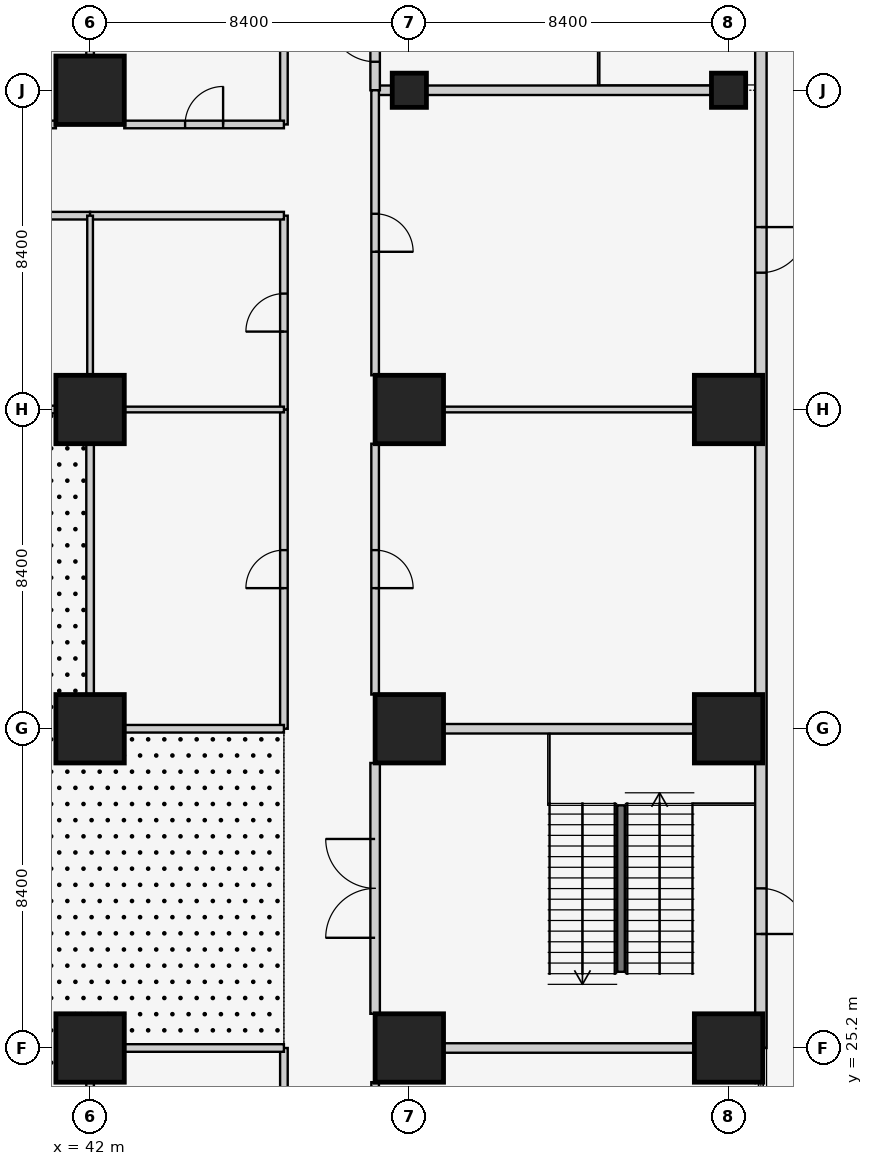
"""IFC4 building model, lengths in metres.
Left out: names, types, materials, properties, quantities, classifications, styles, units other than length and angle.
Written with IfcOpenShell. Run it as: python <this file> out.ifc"""

import sys

from ifc_helpers import new_model, si_unit, direction, frame, frame_2d, origin, origin_2d, place, context, subcontext, project, spatial, rectangle, extrude, element, fill, save


model = new_model("IFC4")
c1 = context("Model", 3, precision=1e-05, world=origin(), true_north=direction((0.0, 1.0)))
c2 = subcontext(c1, "Body", "Model", "MODEL_VIEW")
j1 = project(units=[si_unit("LENGTHUNIT", "METRE"), si_unit("PLANEANGLEUNIT", "RADIAN")], contexts=[c1])
p1 = place(None, origin())
s1 = spatial("IfcSite", under=j1, at=p1, CompositionType="ELEMENT")
p2 = place(p1, origin())
s2 = spatial("IfcBuilding", under=s1, at=p2, CompositionType="ELEMENT")
p3 = place(p2, origin())
s3 = spatial("IfcBuildingStorey", under=s2, at=p3, CompositionType="ELEMENT", Elevation=0.0)
for number, where, z_axis, x_axis in (
    (1, (42.0, 25.2, 0.0), (0.0, 0.0, 1.0), (1.0, 0.0, 0.0)),
    (2, (42.0, 33.6, 0.0), (0.0, 0.0, 1.0), (1.0, 0.0, 0.0)),
    (3, (42.0, 42.0, 0.0), (0.0, 0.0, 1.0), (1.0, 0.0, 0.0)),
    (4, (42.0, 50.4, 0.0), (0.0, 0.0, 1.0), (1.0, 0.0, 0.0)),
    (5, (50.4, 25.2, 0.0), (0.0, 0.0, 1.0), (1.0, 0.0, 0.0)),
    (6, (50.4, 33.6, 0.0), (0.0, 0.0, 1.0), (1.0, 0.0, 0.0)),
    (7, (50.4, 42.0, 0.0), (0.0, 0.0, 1.0), (1.0, 0.0, 0.0)),
):
    element("IfcColumn", number, at=place(p3, frame(where, z_axis=z_axis, x_axis=x_axis)), inside=s3, PredefinedType="COLUMN", context=c2, shape_type="SweptSolid", body=[
        extrude(rectangle(XDim=1.8, YDim=1.8, at=origin_2d()), origin(), (0.0, 0.0, 1.0), 6.0),
    ])
p4 = place(p3, frame((50.4, 50.4, 0.0), z_axis=(0.0, 0.0, 1.0), x_axis=(1.0, 0.0, 0.0)))
e8 = element("IfcColumn", 8, at=p4, inside=s3, PredefinedType="COLUMN", context=c2, shape_type="SweptSolid", body=[
    extrude(rectangle(XDim=0.9, YDim=0.9, at=origin_2d()), origin(), (0.0, 0.0, 1.0), 6.0),
])
for number, where, z_axis, x_axis in (
    (9, (58.8, 25.2, 0.0), (0.0, 0.0, 1.0), (1.0, 0.0, 0.0)),
    (10, (58.8, 33.6, 0.0), (0.0, 0.0, 1.0), (1.0, 0.0, 0.0)),
    (11, (58.8, 42.0, 0.0), (0.0, 0.0, 1.0), (1.0, 0.0, 0.0)),
):
    element("IfcColumn", number, at=place(p3, frame(where, z_axis=z_axis, x_axis=x_axis)), inside=s3, PredefinedType="COLUMN", context=c2, shape_type="SweptSolid", body=[
        extrude(rectangle(XDim=1.8, YDim=1.8, at=origin_2d()), origin(), (0.0, 0.0, 1.0), 6.0),
    ])
p5 = place(p3, frame((58.8, 50.4, 0.0), z_axis=(0.0, 0.0, 1.0), x_axis=(1.0, 0.0, 0.0)))
e12 = element("IfcColumn", 12, at=p5, inside=s3, PredefinedType="COLUMN", context=c2, shape_type="SweptSolid", body=[
    extrude(rectangle(XDim=0.9, YDim=0.9, at=origin_2d()), origin(), (0.0, 0.0, 1.0), 6.0),
])
p6 = place(p3, frame((59.65, 25.2, 0.0), z_axis=(0.0, 0.0, 1.0), x_axis=(0.0, 1.0, 0.0)))
e13 = element("IfcWall", 13, at=p6, inside=s3, PredefinedType="SOLIDWALL", context=c2, shape_type="SweptSolid", body=[
    extrude(rectangle(XDim=33.2, YDim=0.3, at=frame_2d((16.6, 0.0))), origin(), (0.0, 0.0, 1.0), 5.8),
])
p7 = place(p6, frame((3.0, 0.0, 0.0)))
e14 = element("IfcOpeningElement", 14, at=p7, cuts=e13, PredefinedType="OPENING", context=c2, shape_type="SweptSolid", body=[
    extrude(rectangle(XDim=1.2, YDim=2.4, at=frame_2d((0.6, 1.2))), frame((0.0, 0.16, 0.0), z_axis=(0.0, -1.0, 0.0), x_axis=(1.0, 0.0, 0.0)), (0.0, 0.0, 1.0), 0.32),
])
p8 = place(p6, frame((20.4, 0.0, 0.0)))
e15 = element("IfcOpeningElement", 15, at=p8, cuts=e13, PredefinedType="OPENING", context=c2, shape_type="SweptSolid", body=[
    extrude(rectangle(XDim=1.2, YDim=2.4, at=frame_2d((0.6, 1.2))), frame((0.0, 0.16, 0.0), z_axis=(0.0, -1.0, 0.0), x_axis=(1.0, 0.0, 0.0)), (0.0, 0.0, 1.0), 0.32),
])
p9 = place(p6, frame((30.2, 0.0, 0.0)))
e16 = element("IfcOpeningElement", 16, at=p9, cuts=e13, PredefinedType="OPENING", context=c2, shape_type="SweptSolid", body=[
    extrude(rectangle(XDim=1.8, YDim=2.4, at=frame_2d((0.9, 1.2))), frame((0.0, 0.16, 0.0), z_axis=(0.0, -1.0, 0.0), x_axis=(1.0, 0.0, 0.0)), (0.0, 0.0, 1.0), 0.32),
])
for number, where, z_axis, x_axis in (
    (17, (57.9, 25.2, 0.0), (0.0, 0.0, 1.0), (-1.0, 0.0, 0.0)),
    (18, (51.3, 33.6, 0.0), (0.0, 0.0, 1.0), (1.0, 0.0, 0.0)),
):
    element("IfcWall", number, at=place(p3, frame(where, z_axis=z_axis, x_axis=x_axis)), inside=s3, PredefinedType="SOLIDWALL", context=c2, shape_type="SweptSolid", body=[
        extrude(rectangle(XDim=6.6, YDim=0.25, at=frame_2d((3.3, 0.0))), origin(), (0.0, 0.0, 1.0), 5.043),
    ])
p10 = place(p3, frame((49.5, 26.1, 0.0), z_axis=(0.0, 0.0, 1.0), x_axis=(0.0, 1.0, 0.0)))
e19 = element("IfcWall", 19, at=p10, inside=s3, PredefinedType="SOLIDWALL", context=c2, shape_type="SweptSolid", body=[
    extrude(rectangle(XDim=6.6, YDim=0.25, at=frame_2d((3.3, 0.0))), origin(), (0.0, 0.0, 1.0), 5.8),
])
p11 = place(p10, frame((2.0, 0.0, 0.0)))
e20 = element("IfcOpeningElement", 20, at=p11, cuts=e19, PredefinedType="OPENING", context=c2, shape_type="SweptSolid", body=[
    extrude(rectangle(XDim=2.6, YDim=2.4, at=frame_2d((1.3, 1.2))), frame((0.0, 0.135, 0.0), z_axis=(0.0, -1.0, 0.0), x_axis=(1.0, 0.0, 0.0)), (0.0, 0.0, 1.0), 0.27),
])
p12 = place(p3, frame((49.95, 50.4, 0.0), z_axis=(0.0, 0.0, 1.0), x_axis=(-1.0, 0.0, 0.0)))
e21 = element("IfcWall", 21, at=p12, inside=s3, PredefinedType="SOLIDWALL", context=c2, shape_type="SweptSolid", body=[
    extrude(rectangle(XDim=0.45, YDim=0.25, at=frame_2d((0.225, 0.0))), origin(), (0.0, 0.0, 1.0), 5.043),
])
p13 = place(p3, frame((58.35, 50.4, 0.0), z_axis=(0.0, 0.0, 1.0), x_axis=(-1.0, 0.0, 0.0)))
e22 = element("IfcWall", 22, at=p13, inside=s3, PredefinedType="SOLIDWALL", context=c2, shape_type="SweptSolid", body=[
    extrude(rectangle(XDim=7.5, YDim=0.25, at=frame_2d((3.75, 0.0))), origin(), (0.0, 0.0, 1.0), 5.043),
])
p14 = place(p3, frame((49.5, 50.4, 0.0), z_axis=(0.0, 0.0, 1.0), x_axis=(0.0, 1.0, 0.0)))
e23 = element("IfcWall", 23, at=p14, inside=s3, PredefinedType="SOLIDWALL", context=c2, shape_type="SweptSolid", body=[
    extrude(rectangle(XDim=2.7, YDim=0.25, at=frame_2d((1.35, 0.0))), origin(), (0.0, 0.0, 1.0), 5.8),
])
p15 = place(p14, frame((0.75, 0.0, 0.0)))
e24 = element("IfcOpeningElement", 24, at=p15, cuts=e23, PredefinedType="OPENING", context=c2, shape_type="SweptSolid", body=[
    extrude(rectangle(XDim=1.2, YDim=2.1, at=frame_2d((0.6, 1.05))), frame((0.0, 0.135, 0.0), z_axis=(0.0, -1.0, 0.0), x_axis=(1.0, 0.0, 0.0)), (0.0, 0.0, 1.0), 0.27),
])
p16 = place(p3, frame((49.5, 17.7, 0.0), z_axis=(0.0, 0.0, 1.0), x_axis=(0.0, 1.0, 0.0)))
e25 = element("IfcWall", 25, at=p16, inside=s3, PredefinedType="PARTITIONING", context=c2, shape_type="SweptSolid", body=[
    extrude(rectangle(XDim=6.6, YDim=0.2, at=frame_2d((3.3, 0.0))), origin(), (0.0, 0.0, 1.0), 5.8),
])
p17 = place(p16, frame((2.8, 0.0, 0.0)))
e26 = element("IfcOpeningElement", 26, at=p17, cuts=e25, PredefinedType="OPENING", context=c2, shape_type="SweptSolid", body=[
    extrude(rectangle(XDim=1.0, YDim=2.1, at=frame_2d((0.5, 1.05))), frame((0.0, 0.11, 0.0), z_axis=(0.0, -1.0, 0.0), x_axis=(1.0, 0.0, 0.0)), (0.0, 0.0, 1.0), 0.22),
])
p18 = place(p3, frame((51.3, 42.0, 0.0), z_axis=(0.0, 0.0, 1.0), x_axis=(1.0, 0.0, 0.0)))
e27 = element("IfcWall", 27, at=p18, inside=s3, PredefinedType="PARTITIONING", context=c2, shape_type="SweptSolid", body=[
    extrude(rectangle(XDim=6.6, YDim=0.15, at=frame_2d((3.3, 0.0))), origin(), (0.0, 0.0, 1.0), 5.043),
])
p19 = place(p3, frame((49.5, 34.5, 0.0), z_axis=(0.0, 0.0, 1.0), x_axis=(0.0, 1.0, 0.0)))
e28 = element("IfcWall", 28, at=p19, inside=s3, PredefinedType="PARTITIONING", context=c2, shape_type="SweptSolid", body=[
    extrude(rectangle(XDim=6.6, YDim=0.2, at=frame_2d((3.3, 0.0))), origin(), (0.0, 0.0, 1.0), 5.8),
])
p20 = place(p19, frame((2.8, 0.0, 0.0)))
e29 = element("IfcOpeningElement", 29, at=p20, cuts=e28, PredefinedType="OPENING", context=c2, shape_type="SweptSolid", body=[
    extrude(rectangle(XDim=1.0, YDim=2.1, at=frame_2d((0.5, 1.05))), frame((0.0, 0.11, 0.0), z_axis=(0.0, -1.0, 0.0), x_axis=(1.0, 0.0, 0.0)), (0.0, 0.0, 1.0), 0.22),
])
p21 = place(p3, frame((49.5, 42.9, 0.0), z_axis=(0.0, 0.0, 1.0), x_axis=(0.0, 1.0, 0.0)))
e30 = element("IfcWall", 30, at=p21, inside=s3, PredefinedType="PARTITIONING", context=c2, shape_type="SweptSolid", body=[
    extrude(rectangle(XDim=7.5, YDim=0.2, at=frame_2d((3.75, 0.0))), origin(), (0.0, 0.0, 1.0), 5.8),
])
p22 = place(p21, frame((3.25, 0.0, 0.0)))
e31 = element("IfcOpeningElement", 31, at=p22, cuts=e30, PredefinedType="OPENING", context=c2, shape_type="SweptSolid", body=[
    extrude(rectangle(XDim=1.0, YDim=2.1, at=frame_2d((0.5, 1.05))), frame((0.0, 0.11, 0.0), z_axis=(0.0, -1.0, 0.0), x_axis=(1.0, 0.0, 0.0)), (0.0, 0.0, 1.0), 0.22),
])
p23 = place(p3, frame((42.0, 57.9, 0.0), z_axis=(0.0, 0.0, 1.0), x_axis=(0.0, -1.0, 0.0)))
e32 = element("IfcWall", 32, at=p23, inside=s3, PredefinedType="SOLIDWALL", context=c2, shape_type="SweptSolid", body=[
    extrude(rectangle(XDim=6.6, YDim=0.2, at=frame_2d((3.3, 0.0))), origin(), (0.0, 0.0, 1.0), 5.043),
])
p24 = place(p3, frame((41.1, 49.5, 0.0), z_axis=(0.0, 0.0, 1.0), x_axis=(-1.0, 0.0, 0.0)))
e33 = element("IfcWall", 33, at=p24, inside=s3, PredefinedType="SOLIDWALL", context=c2, shape_type="SweptSolid", body=[
    extrude(rectangle(XDim=6.6, YDim=0.2, at=frame_2d((3.3, 0.0))), origin(), (0.0, 0.0, 1.0), 5.8),
])
p25 = place(p24, frame((2.8, 0.0, 0.0)))
e34 = element("IfcOpeningElement", 34, at=p25, cuts=e33, PredefinedType="OPENING", context=c2, shape_type="SweptSolid", body=[
    extrude(rectangle(XDim=1.0, YDim=2.1, at=frame_2d((0.5, 1.05))), frame((0.0, 0.11, 0.0), z_axis=(0.0, -1.0, 0.0), x_axis=(1.0, 0.0, 0.0)), (0.0, 0.0, 1.0), 0.22),
])
p26 = place(p3, frame((47.1, 53.1, 0.0), z_axis=(0.0, 0.0, 1.0), x_axis=(0.0, -1.0, 0.0)))
e35 = element("IfcWall", 35, at=p26, inside=s3, PredefinedType="PARTITIONING", context=c2, shape_type="SweptSolid", body=[
    extrude(rectangle(XDim=3.6, YDim=0.2, at=frame_2d((1.8, 0.0))), origin(), (0.0, 0.0, 1.0), 5.8),
])
p27 = place(p3, frame((47.1, 49.5, 0.0), z_axis=(0.0, 0.0, 1.0), x_axis=(-1.0, 0.0, 0.0)))
e36 = element("IfcWall", 36, at=p27, inside=s3, PredefinedType="PARTITIONING", context=c2, shape_type="SweptSolid", body=[
    extrude(rectangle(XDim=4.2, YDim=0.2, at=frame_2d((2.1, 0.0))), origin(), (0.0, 0.0, 1.0), 5.8),
])
p28 = place(p27, frame((1.6, 0.0, 0.0)))
e37 = element("IfcOpeningElement", 37, at=p28, cuts=e36, PredefinedType="OPENING", context=c2, shape_type="SweptSolid", body=[
    extrude(rectangle(XDim=1.0, YDim=2.1, at=frame_2d((0.5, 1.05))), frame((0.0, 0.11, 0.0), z_axis=(0.0, -1.0, 0.0), x_axis=(1.0, 0.0, 0.0)), (0.0, 0.0, 1.0), 0.22),
])
p29 = place(p3, frame((47.1, 16.8, 0.0), z_axis=(0.0, 0.0, 1.0), x_axis=(0.0, 1.0, 0.0)))
e38 = element("IfcWall", 38, at=p29, inside=s3, PredefinedType="PARTITIONING", context=c2, shape_type="SweptSolid", body=[
    extrude(rectangle(XDim=8.4, YDim=0.2, at=frame_2d((4.2, 0.0))), origin(), (0.0, 0.0, 1.0), 5.8),
])
p30 = place(p29, frame((3.7, 0.0, 0.0)))
e39 = element("IfcOpeningElement", 39, at=p30, cuts=e38, PredefinedType="OPENING", context=c2, shape_type="SweptSolid", body=[
    extrude(rectangle(XDim=1.0, YDim=2.1, at=frame_2d((0.5, 1.05))), frame((0.0, 0.11, 0.0), z_axis=(0.0, -1.0, 0.0), x_axis=(1.0, 0.0, 0.0)), (0.0, 0.0, 1.0), 0.22),
])
p31 = place(p3, frame((47.1, 33.6, 0.0), z_axis=(0.0, 0.0, 1.0), x_axis=(0.0, 1.0, 0.0)))
e40 = element("IfcWall", 40, at=p31, inside=s3, PredefinedType="PARTITIONING", context=c2, shape_type="SweptSolid", body=[
    extrude(rectangle(XDim=8.4, YDim=0.2, at=frame_2d((4.2, 0.0))), origin(), (0.0, 0.0, 1.0), 5.8),
])
p32 = place(p31, frame((3.7, 0.0, 0.0)))
e41 = element("IfcOpeningElement", 41, at=p32, cuts=e40, PredefinedType="OPENING", context=c2, shape_type="SweptSolid", body=[
    extrude(rectangle(XDim=1.0, YDim=2.1, at=frame_2d((0.5, 1.05))), frame((0.0, 0.11, 0.0), z_axis=(0.0, -1.0, 0.0), x_axis=(1.0, 0.0, 0.0)), (0.0, 0.0, 1.0), 0.22),
])
p33 = place(p3, frame((42.0, 47.1, 0.0), z_axis=(0.0, 0.0, 1.0), x_axis=(-1.0, 0.0, 0.0)))
e42 = element("IfcWall", 42, at=p33, inside=s3, PredefinedType="PARTITIONING", context=c2, shape_type="SweptSolid", body=[
    extrude(rectangle(XDim=25.2, YDim=0.2, at=frame_2d((12.6, 0.0))), origin(), (0.0, 0.0, 1.0), 5.8),
])
p34 = place(p33, frame((11.7, 0.0, 0.0)))
e43 = element("IfcOpeningElement", 43, at=p34, cuts=e42, PredefinedType="OPENING", context=c2, shape_type="SweptSolid", body=[
    extrude(rectangle(XDim=1.8, YDim=2.4, at=frame_2d((0.9, 1.2))), frame((0.0, 0.11, 0.0), z_axis=(0.0, -1.0, 0.0), x_axis=(1.0, 0.0, 0.0)), (0.0, 0.0, 1.0), 0.22),
])
p35 = place(p3, frame((47.1, 42.0, 0.0), z_axis=(0.0, 0.0, 1.0), x_axis=(0.0, 1.0, 0.0)))
e44 = element("IfcWall", 44, at=p35, inside=s3, PredefinedType="PARTITIONING", context=c2, shape_type="SweptSolid", body=[
    extrude(rectangle(XDim=5.1, YDim=0.2, at=frame_2d((2.55, 0.0))), origin(), (0.0, 0.0, 1.0), 5.8),
])
p36 = place(p35, frame((2.05, 0.0, 0.0)))
e45 = element("IfcOpeningElement", 45, at=p36, cuts=e44, PredefinedType="OPENING", context=c2, shape_type="SweptSolid", body=[
    extrude(rectangle(XDim=1.0, YDim=2.1, at=frame_2d((0.5, 1.05))), frame((0.0, 0.11, 0.0), z_axis=(0.0, -1.0, 0.0), x_axis=(1.0, 0.0, 0.0)), (0.0, 0.0, 1.0), 0.22),
])
p37 = place(p3, frame((47.1, 47.1, 0.0), z_axis=(0.0, 0.0, 1.0), x_axis=(-1.0, 0.0, 0.0)))
e46 = element("IfcWall", 46, at=p37, inside=s3, PredefinedType="PARTITIONING", context=c2, shape_type="SweptSolid", body=[
    extrude(rectangle(XDim=5.1, YDim=0.2, at=frame_2d((2.55, 0.0))), origin(), (0.0, 0.0, 1.0), 5.8),
])
p38 = place(p3, frame((42.0, 24.3, 0.0), z_axis=(0.0, 0.0, 1.0), x_axis=(0.0, -1.0, 0.0)))
e47 = element("IfcWall", 47, at=p38, inside=s3, PredefinedType="PARTITIONING", context=c2, shape_type="SweptSolid", body=[
    extrude(rectangle(XDim=6.6, YDim=0.2, at=frame_2d((3.3, 0.0))), origin(), (0.0, 0.0, 1.0), 5.043),
])
p39 = place(p3, frame((47.1, 25.2, 0.0), z_axis=(0.0, 0.0, 1.0), x_axis=(-1.0, 0.0, 0.0)))
e48 = element("IfcWall", 48, at=p39, inside=s3, PredefinedType="PARTITIONING", context=c2, shape_type="SweptSolid", body=[
    extrude(rectangle(XDim=4.2, YDim=0.2, at=frame_2d((2.1, 0.0))), origin(), (0.0, 0.0, 1.0), 5.043),
])
p40 = place(p3, frame((42.0, 41.1, 0.0), z_axis=(0.0, 0.0, 1.0), x_axis=(0.0, -1.0, 0.0)))
e49 = element("IfcWall", 49, at=p40, inside=s3, PredefinedType="PARTITIONING", context=c2, shape_type="SweptSolid", body=[
    extrude(rectangle(XDim=6.6, YDim=0.2, at=frame_2d((3.3, 0.0))), origin(), (0.0, 0.0, 1.0), 5.043),
])
p41 = place(p3, frame((42.9, 33.6, 0.0), z_axis=(0.0, 0.0, 1.0), x_axis=(1.0, 0.0, 0.0)))
e50 = element("IfcWall", 50, at=p41, inside=s3, PredefinedType="PARTITIONING", context=c2, shape_type="SweptSolid", body=[
    extrude(rectangle(XDim=4.2, YDim=0.2, at=frame_2d((2.1, 0.0))), origin(), (0.0, 0.0, 1.0), 5.043),
])
p42 = place(p3, frame((34.5, 42.0, 0.0), z_axis=(0.0, 0.0, 1.0), x_axis=(1.0, 0.0, 0.0)))
e51 = element("IfcWall", 51, at=p42, inside=s3, PredefinedType="PARTITIONING", context=c2, shape_type="SweptSolid", body=[
    extrude(rectangle(XDim=6.6, YDim=0.2, at=frame_2d((3.3, 0.0))), origin(), (0.0, 0.0, 1.0), 5.043),
])
for number, where, z_axis, x_axis in (
    (52, (42.9, 42.0, 0.0), (0.0, 0.0, 1.0), (1.0, 0.0, 0.0)),
    (53, (42.0, 47.1, 0.0), (0.0, 0.0, 1.0), (0.0, -1.0, 0.0)),
):
    element("IfcWall", number, at=place(p3, frame(where, z_axis=z_axis, x_axis=x_axis)), inside=s3, PredefinedType="PARTITIONING", context=c2, shape_type="SweptSolid", body=[
        extrude(rectangle(XDim=4.2, YDim=0.15, at=frame_2d((2.1, 0.0))), origin(), (0.0, 0.0, 1.0), 5.043),
    ])
p43 = place(p3, frame((55.97, 27.205, 0.0), z_axis=(0.0, 0.0, 1.0), x_axis=(0.0, 1.0, 0.0)))
e54 = element("IfcWall", 54, at=p43, inside=s3, PredefinedType="SOLIDWALL", context=c2, shape_type="SweptSolid", body=[
    extrude(rectangle(XDim=4.38, YDim=0.2, at=frame_2d((2.19, 0.0))), origin(), (0.0, 0.0, 1.0), 6.0),
])
p44 = place(p7, frame((1.2, 0.0, 0.0), z_axis=(0.0, 0.0, 1.0), x_axis=(-1.0, 0.0, 0.0)))
e55 = element("IfcDoor", 55, at=p44, inside=s3, OperationType="SINGLE_SWING_RIGHT", PredefinedType="DOOR", context=c2, shape_type="SweptSolid", body=[
    extrude(rectangle(XDim=1.2, YDim=2.4, at=frame_2d((0.6, 1.2))), frame((0.0, 0.025, 0.0), z_axis=(0.0, -1.0, 0.0), x_axis=(1.0, 0.0, 0.0)), (0.0, 0.0, 1.0), 0.05),
])
fill(e14, e55)
p45 = place(p8, frame((1.2, 0.0, 0.0), z_axis=(0.0, 0.0, 1.0), x_axis=(-1.0, 0.0, 0.0)))
e56 = element("IfcDoor", 56, at=p45, inside=s3, OperationType="SINGLE_SWING_LEFT", PredefinedType="DOOR", context=c2, shape_type="SweptSolid", body=[
    extrude(rectangle(XDim=1.2, YDim=2.4, at=frame_2d((0.6, 1.2))), frame((0.0, 0.025, 0.0), z_axis=(0.0, -1.0, 0.0), x_axis=(1.0, 0.0, 0.0)), (0.0, 0.0, 1.0), 0.05),
])
fill(e15, e56)
p46 = place(p11, origin())
e57 = element("IfcDoor", 57, at=p46, inside=s3, OperationType="DOUBLE_DOOR_SINGLE_SWING", PredefinedType="DOOR", context=c2, shape_type="SweptSolid", body=[
    extrude(rectangle(XDim=2.6, YDim=2.4, at=frame_2d((1.3, 1.2))), frame((0.0, 0.025, 0.0), z_axis=(0.0, -1.0, 0.0), x_axis=(1.0, 0.0, 0.0)), (0.0, 0.0, 1.0), 0.05),
])
fill(e20, e57)
p47 = place(p15, origin())
e58 = element("IfcDoor", 58, at=p47, inside=s3, OperationType="SINGLE_SWING_RIGHT", PredefinedType="DOOR", context=c2, shape_type="SweptSolid", body=[
    extrude(rectangle(XDim=1.2, YDim=2.1, at=frame_2d((0.6, 1.05))), frame((0.0, 0.025, 0.0), z_axis=(0.0, -1.0, 0.0), x_axis=(1.0, 0.0, 0.0)), (0.0, 0.0, 1.0), 0.05),
])
fill(e24, e58)
p48 = place(p20, frame((1.0, 0.0, 0.0), z_axis=(0.0, 0.0, 1.0), x_axis=(-1.0, 0.0, 0.0)))
e59 = element("IfcDoor", 59, at=p48, inside=s3, OperationType="SINGLE_SWING_RIGHT", PredefinedType="DOOR", context=c2, shape_type="SweptSolid", body=[
    extrude(rectangle(XDim=1.0, YDim=2.1, at=frame_2d((0.5, 1.05))), frame((0.0, 0.025, 0.0), z_axis=(0.0, -1.0, 0.0), x_axis=(1.0, 0.0, 0.0)), (0.0, 0.0, 1.0), 0.05),
])
fill(e29, e59)
p49 = place(p22, frame((1.0, 0.0, 0.0), z_axis=(0.0, 0.0, 1.0), x_axis=(-1.0, 0.0, 0.0)))
e60 = element("IfcDoor", 60, at=p49, inside=s3, OperationType="SINGLE_SWING_RIGHT", PredefinedType="DOOR", context=c2, shape_type="SweptSolid", body=[
    extrude(rectangle(XDim=1.0, YDim=2.1, at=frame_2d((0.5, 1.05))), frame((0.0, 0.025, 0.0), z_axis=(0.0, -1.0, 0.0), x_axis=(1.0, 0.0, 0.0)), (0.0, 0.0, 1.0), 0.05),
])
fill(e31, e60)
p50 = place(p28, frame((1.0, 0.0, 0.0), z_axis=(0.0, 0.0, 1.0), x_axis=(-1.0, 0.0, 0.0)))
e61 = element("IfcDoor", 61, at=p50, inside=s3, OperationType="SINGLE_SWING_RIGHT", PredefinedType="DOOR", context=c2, shape_type="SweptSolid", body=[
    extrude(rectangle(XDim=1.0, YDim=2.1, at=frame_2d((0.5, 1.05))), frame((0.0, 0.025, 0.0), z_axis=(0.0, -1.0, 0.0), x_axis=(1.0, 0.0, 0.0)), (0.0, 0.0, 1.0), 0.05),
])
fill(e37, e61)
p51 = place(p32, origin())
e62 = element("IfcDoor", 62, at=p51, inside=s3, OperationType="SINGLE_SWING_LEFT", PredefinedType="DOOR", context=c2, shape_type="SweptSolid", body=[
    extrude(rectangle(XDim=1.0, YDim=2.1, at=frame_2d((0.5, 1.05))), frame((0.0, 0.025, 0.0), z_axis=(0.0, -1.0, 0.0), x_axis=(1.0, 0.0, 0.0)), (0.0, 0.0, 1.0), 0.05),
])
fill(e41, e62)
p52 = place(p36, origin())
e63 = element("IfcDoor", 63, at=p52, inside=s3, OperationType="SINGLE_SWING_LEFT", PredefinedType="DOOR", context=c2, shape_type="SweptSolid", body=[
    extrude(rectangle(XDim=1.0, YDim=2.1, at=frame_2d((0.5, 1.05))), frame((0.0, 0.025, 0.0), z_axis=(0.0, -1.0, 0.0), x_axis=(1.0, 0.0, 0.0)), (0.0, 0.0, 1.0), 0.05),
])
fill(e45, e63)
save(model, sys.argv[1])
